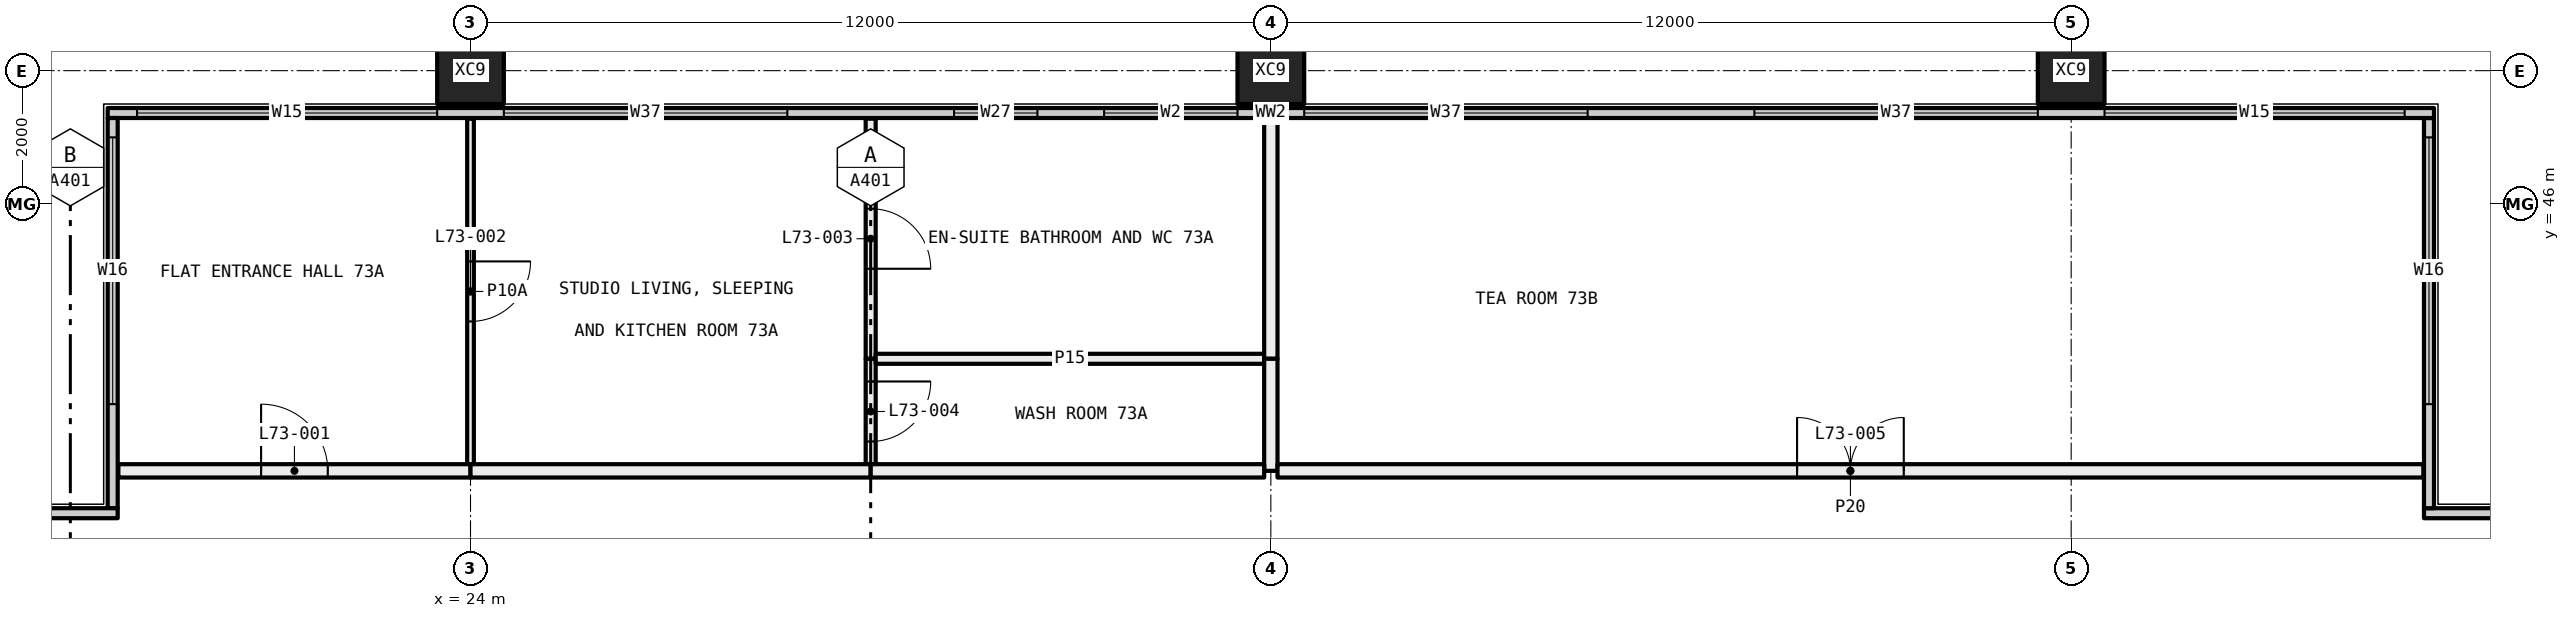
"""IFC4 building model, lengths in metres.
Left out: names, types, materials, properties, quantities, classifications, styles, units other than length and angle.
Written with IfcOpenShell. Run it as: python <this file> out.ifc"""

import sys

from ifc_helpers import new_model, si_unit, direction, frame, frame_2d, origin, origin_2d, place, context, subcontext, project, spatial, rectangle, hollow_rectangle, extrude, element, fill, save


model = new_model("IFC4")
c1 = context("Model", 3, precision=1e-05, world=origin(), true_north=direction((0.0, 1.0)))
c2 = subcontext(c1, "Body", "Model", "MODEL_VIEW")
j1 = project(units=[si_unit("LENGTHUNIT", "METRE"), si_unit("PLANEANGLEUNIT", "RADIAN")], contexts=[c1])
p1 = place(None, origin())
s1 = spatial("IfcSite", under=j1, at=p1, CompositionType="ELEMENT")
p2 = place(p1, origin())
s2 = spatial("IfcBuilding", under=s1, at=p2, CompositionType="ELEMENT")
p3 = place(p2, frame((0.0, 0.0, 269.7)))
s3 = spatial("IfcBuildingStorey", under=s2, at=p3, CompositionType="ELEMENT", Elevation=269.7)
for number, where, z_axis, x_axis in (
    (1, (24.0, 48.0, -0.4), (0.0, 0.0, 1.0), (1.0, 0.0, 0.0)),
    (2, (36.0, 48.0, -0.4), (0.0, 0.0, 1.0), (1.0, 0.0, 0.0)),
    (3, (48.0, 48.0, -0.4), (0.0, 0.0, 1.0), (1.0, 0.0, 0.0)),
):
    element("IfcColumn", number, at=place(p3, frame(where, z_axis=z_axis, x_axis=x_axis)), inside=s3, PredefinedType="COLUMN", context=c2, shape_type="SweptSolid", body=[
        extrude(hollow_rectangle(XDim=1.0, YDim=1.0, WallThickness=0.036, at=origin_2d()), origin(), (0.0, 0.0, 1.0), 3.45),
    ])
p4 = place(p3, frame((53.29, 41.365, 0.0), z_axis=(0.0, 0.0, 1.0), x_axis=(1.0, 0.0, 0.0)))
e4 = element("IfcWall", 4, at=p4, inside=s3, PredefinedType="ELEMENTEDWALL", context=c2, shape_type="SweptSolid", body=[
    extrude(rectangle(XDim=6.15, YDim=0.15, at=frame_2d((3.075, 0.0))), origin(), (0.0, 0.0, 1.0), 3.05),
])
p5 = place(p4, frame((1.71, 0.0, 0.45)))
e5 = element("IfcOpeningElement", 5, at=p5, cuts=e4, PredefinedType="OPENING", context=c2, shape_type="SweptSolid", body=[
    extrude(rectangle(XDim=4.0, YDim=2.55, at=frame_2d((2.0, 1.275))), frame((0.0, 0.085, 0.0), z_axis=(0.0, -1.0, 0.0), x_axis=(1.0, 0.0, 0.0)), (0.0, 0.0, 1.0), 0.17),
])
p6 = place(p3, frame((53.365, 41.44, 0.0), z_axis=(0.0, 0.0, 1.0), x_axis=(0.0, 1.0, 0.0)))
e6 = element("IfcWall", 6, at=p6, inside=s3, PredefinedType="ELEMENTEDWALL", context=c2, shape_type="SweptSolid", body=[
    extrude(rectangle(XDim=5.85, YDim=0.15, at=frame_2d((2.925, 0.0))), origin(), (0.0, 0.0, 1.0), 3.05),
])
p7 = place(p6, frame((1.56, 0.0, 0.45)))
e7 = element("IfcOpeningElement", 7, at=p7, cuts=e6, PredefinedType="OPENING", context=c2, shape_type="SweptSolid", body=[
    extrude(rectangle(XDim=4.0, YDim=2.55, at=frame_2d((2.0, 1.275))), frame((0.0, 0.085, 0.0), z_axis=(0.0, -1.0, 0.0), x_axis=(1.0, 0.0, 0.0)), (0.0, 0.0, 1.0), 0.17),
])
p8 = place(p3, frame((18.56, 47.365, 0.0), z_axis=(0.0, 0.0, 1.0), x_axis=(1.0, 0.0, 0.0)))
e8 = element("IfcWall", 8, at=p8, inside=s3, PredefinedType="ELEMENTEDWALL", context=c2, shape_type="SweptSolid", body=[
    extrude(rectangle(XDim=34.88, YDim=0.15, at=frame_2d((17.44, 0.0))), origin(), (0.0, 0.0, 1.0), 3.05),
])
p9 = place(p8, frame((0.44, 0.0, 0.45)))
e9 = element("IfcOpeningElement", 9, at=p9, cuts=e8, PredefinedType="OPENING", context=c2, shape_type="SweptSolid", body=[
    extrude(rectangle(XDim=4.5, YDim=2.55, at=frame_2d((2.25, 1.275))), frame((0.0, 0.085, 0.0), z_axis=(0.0, -1.0, 0.0), x_axis=(1.0, 0.0, 0.0)), (0.0, 0.0, 1.0), 0.17),
])
p10 = place(p8, frame((5.94, 0.0, 0.45)))
e10 = element("IfcOpeningElement", 10, at=p10, cuts=e8, PredefinedType="OPENING", context=c2, shape_type="SweptSolid", body=[
    extrude(rectangle(XDim=4.25, YDim=2.55, at=frame_2d((2.125, 1.275))), frame((0.0, 0.085, 0.0), z_axis=(0.0, -1.0, 0.0), x_axis=(1.0, 0.0, 0.0)), (0.0, 0.0, 1.0), 0.17),
])
p11 = place(p8, frame((12.69, 0.0, 0.45)))
e11 = element("IfcOpeningElement", 11, at=p11, cuts=e8, PredefinedType="OPENING", context=c2, shape_type="SweptSolid", body=[
    extrude(rectangle(XDim=1.25, YDim=2.55, at=frame_2d((0.625, 1.275))), frame((0.0, 0.085, 0.0), z_axis=(0.0, -1.0, 0.0), x_axis=(1.0, 0.0, 0.0)), (0.0, 0.0, 1.0), 0.17),
])
p12 = place(p8, frame((14.94, 0.0, 0.45)))
e12 = element("IfcOpeningElement", 12, at=p12, cuts=e8, PredefinedType="OPENING", context=c2, shape_type="SweptSolid", body=[
    extrude(rectangle(XDim=2.0, YDim=2.55, at=frame_2d((1.0, 1.275))), frame((0.0, 0.085, 0.0), z_axis=(0.0, -1.0, 0.0), x_axis=(1.0, 0.0, 0.0)), (0.0, 0.0, 1.0), 0.17),
])
p13 = place(p8, frame((17.94, 0.0, 0.45)))
e13 = element("IfcOpeningElement", 13, at=p13, cuts=e8, PredefinedType="OPENING", context=c2, shape_type="SweptSolid", body=[
    extrude(rectangle(XDim=4.25, YDim=2.55, at=frame_2d((2.125, 1.275))), frame((0.0, 0.085, 0.0), z_axis=(0.0, -1.0, 0.0), x_axis=(1.0, 0.0, 0.0)), (0.0, 0.0, 1.0), 0.17),
])
p14 = place(p8, frame((24.69, 0.0, 0.45)))
e14 = element("IfcOpeningElement", 14, at=p14, cuts=e8, PredefinedType="OPENING", context=c2, shape_type="SweptSolid", body=[
    extrude(rectangle(XDim=4.25, YDim=2.55, at=frame_2d((2.125, 1.275))), frame((0.0, 0.085, 0.0), z_axis=(0.0, -1.0, 0.0), x_axis=(1.0, 0.0, 0.0)), (0.0, 0.0, 1.0), 0.17),
])
p15 = place(p8, frame((29.94, 0.0, 0.45)))
e15 = element("IfcOpeningElement", 15, at=p15, cuts=e8, PredefinedType="OPENING", context=c2, shape_type="SweptSolid", body=[
    extrude(rectangle(XDim=4.5, YDim=2.55, at=frame_2d((2.25, 1.275))), frame((0.0, 0.085, 0.0), z_axis=(0.0, -1.0, 0.0), x_axis=(1.0, 0.0, 0.0)), (0.0, 0.0, 1.0), 0.17),
])
p16 = place(p3, frame((18.635, 41.44, 0.0), z_axis=(0.0, 0.0, 1.0), x_axis=(0.0, 1.0, 0.0)))
e16 = element("IfcWall", 16, at=p16, inside=s3, PredefinedType="ELEMENTEDWALL", context=c2, shape_type="SweptSolid", body=[
    extrude(rectangle(XDim=5.85, YDim=0.15, at=frame_2d((2.925, 0.0))), origin(), (0.0, 0.0, 1.0), 3.05),
])
p17 = place(p16, frame((1.56, 0.0, 0.45)))
e17 = element("IfcOpeningElement", 17, at=p17, cuts=e16, PredefinedType="OPENING", context=c2, shape_type="SweptSolid", body=[
    extrude(rectangle(XDim=4.0, YDim=2.55, at=frame_2d((2.0, 1.275))), frame((0.0, 0.085, 0.0), z_axis=(0.0, -1.0, 0.0), x_axis=(1.0, 0.0, 0.0)), (0.0, 0.0, 1.0), 0.17),
])
p18 = place(p3, frame((12.56, 41.365, 0.0), z_axis=(0.0, 0.0, 1.0), x_axis=(1.0, 0.0, 0.0)))
e18 = element("IfcWall", 18, at=p18, inside=s3, PredefinedType="ELEMENTEDWALL", context=c2, shape_type="SweptSolid", body=[
    extrude(rectangle(XDim=6.15, YDim=0.15, at=frame_2d((3.075, 0.0))), origin(), (0.0, 0.0, 1.0), 3.05),
])
p19 = place(p18, frame((0.44, 0.0, 0.45)))
e19 = element("IfcOpeningElement", 19, at=p19, cuts=e18, PredefinedType="OPENING", context=c2, shape_type="SweptSolid", body=[
    extrude(rectangle(XDim=4.0, YDim=2.55, at=frame_2d((2.0, 1.275))), frame((0.0, 0.085, 0.0), z_axis=(0.0, -1.0, 0.0), x_axis=(1.0, 0.0, 0.0)), (0.0, 0.0, 1.0), 0.17),
])
p20 = place(p3, frame((24.0, 42.1, 0.0), z_axis=(0.0, 0.0, 1.0), x_axis=(0.0, 1.0, 0.0)))
e20 = element("IfcWall", 20, at=p20, inside=s3, PredefinedType="PARTITIONING", context=c2, shape_type="SweptSolid", body=[
    extrude(rectangle(XDim=5.18, YDim=0.1, at=frame_2d((2.59, 0.0))), origin(), (0.0, 0.0, 1.0), 3.05),
])
p21 = place(p20, frame((2.14, 0.0, 0.0)))
e21 = element("IfcOpeningElement", 21, at=p21, cuts=e20, PredefinedType="OPENING", context=c2, shape_type="SweptSolid", body=[
    extrude(rectangle(XDim=0.9, YDim=2.1, at=frame_2d((0.45, 1.05))), frame((0.0, 0.06, 0.0), z_axis=(0.0, -1.0, 0.0), x_axis=(1.0, 0.0, 0.0)), (0.0, 0.0, 1.0), 0.12),
])
p22 = place(p3, frame((18.72, 42.0, 0.0), z_axis=(0.0, 0.0, 1.0), x_axis=(1.0, 0.0, 0.0)))
e22 = element("IfcWall", 22, at=p22, inside=s3, PredefinedType="PARTITIONING", context=c2, shape_type="SweptSolid", body=[
    extrude(rectangle(XDim=5.28, YDim=0.2, at=frame_2d((2.64, 0.0))), origin(), (0.0, 0.0, 1.0), 3.05),
])
p23 = place(p22, frame((2.14, 0.0, 0.0)))
e23 = element("IfcOpeningElement", 23, at=p23, cuts=e22, PredefinedType="OPENING", context=c2, shape_type="SweptSolid", body=[
    extrude(rectangle(XDim=1.0, YDim=2.1, at=frame_2d((0.5, 1.05))), frame((0.0, 0.11, 0.0), z_axis=(0.0, -1.0, 0.0), x_axis=(1.0, 0.0, 0.0)), (0.0, 0.0, 1.0), 0.22),
])
p24 = place(p3, frame((30.0, 43.68, 0.0), z_axis=(0.0, 0.0, 1.0), x_axis=(0.0, 1.0, 0.0)))
e24 = element("IfcWall", 24, at=p24, inside=s3, PredefinedType="PARTITIONING", context=c2, shape_type="SweptSolid", body=[
    extrude(rectangle(XDim=3.6, YDim=0.15, at=frame_2d((1.8, 0.0))), origin(), (0.0, 0.0, 1.0), 3.05),
])
p25 = place(p24, frame((1.35, 0.0, 0.0)))
e25 = element("IfcOpeningElement", 25, at=p25, cuts=e24, PredefinedType="OPENING", context=c2, shape_type="SweptSolid", body=[
    extrude(rectangle(XDim=0.9, YDim=2.1, at=frame_2d((0.45, 1.05))), frame((0.0, 0.085, 0.0), z_axis=(0.0, -1.0, 0.0), x_axis=(1.0, 0.0, 0.0)), (0.0, 0.0, 1.0), 0.17),
])
p26 = place(p3, frame((30.0, 42.1, 0.0), z_axis=(0.0, 0.0, 1.0), x_axis=(0.0, 1.0, 0.0)))
e26 = element("IfcWall", 26, at=p26, inside=s3, PredefinedType="PARTITIONING", context=c2, shape_type="SweptSolid", body=[
    extrude(rectangle(XDim=1.58, YDim=0.15, at=frame_2d((0.79, 0.0))), origin(), (0.0, 0.0, 1.0), 3.05),
])
p27 = place(p26, frame((0.34, 0.0, 0.0)))
e27 = element("IfcOpeningElement", 27, at=p27, cuts=e26, PredefinedType="OPENING", context=c2, shape_type="SweptSolid", body=[
    extrude(rectangle(XDim=0.9, YDim=2.1, at=frame_2d((0.45, 1.05))), frame((0.0, 0.085, 0.0), z_axis=(0.0, -1.0, 0.0), x_axis=(1.0, 0.0, 0.0)), (0.0, 0.0, 1.0), 0.17),
])
p28 = place(p3, frame((24.0, 42.0, 0.0), z_axis=(0.0, 0.0, 1.0), x_axis=(1.0, 0.0, 0.0)))
e28 = element("IfcWall", 28, at=p28, inside=s3, PredefinedType="PARTITIONING", context=c2, shape_type="SweptSolid", body=[
    extrude(rectangle(XDim=6.0, YDim=0.2, at=frame_2d((3.0, 0.0))), origin(), (0.0, 0.0, 1.0), 3.05),
])
p29 = place(p3, frame((30.075, 43.68, 0.0), z_axis=(0.0, 0.0, 1.0), x_axis=(1.0, 0.0, 0.0)))
e29 = element("IfcWall", 29, at=p29, inside=s3, PredefinedType="PARTITIONING", context=c2, shape_type="SweptSolid", body=[
    extrude(rectangle(XDim=5.825, YDim=0.15, at=frame_2d((2.913, 0.0))), origin(), (0.0, 0.0, 1.0), 3.05),
])
p30 = place(p3, frame((36.0, 43.68, 0.0), z_axis=(0.0, 0.0, 1.0), x_axis=(0.0, 1.0, 0.0)))
e30 = element("IfcWall", 30, at=p30, inside=s3, PredefinedType="PARTITIONING", context=c2, shape_type="SweptSolid", body=[
    extrude(rectangle(XDim=3.6, YDim=0.2, at=frame_2d((1.8, 0.0))), origin(), (0.0, 0.0, 1.0), 2.45),
])
p31 = place(p3, frame((36.0, 42.0, 0.0), z_axis=(0.0, 0.0, 1.0), x_axis=(0.0, 1.0, 0.0)))
e31 = element("IfcWall", 31, at=p31, inside=s3, PredefinedType="PARTITIONING", context=c2, shape_type="SweptSolid", body=[
    extrude(rectangle(XDim=1.68, YDim=0.2, at=frame_2d((0.84, 0.0))), origin(), (0.0, 0.0, 1.0), 2.45),
])
p32 = place(p3, frame((30.0, 42.0, 0.0), z_axis=(0.0, 0.0, 1.0), x_axis=(1.0, 0.0, 0.0)))
e32 = element("IfcWall", 32, at=p32, inside=s3, PredefinedType="PARTITIONING", context=c2, shape_type="SweptSolid", body=[
    extrude(rectangle(XDim=5.9, YDim=0.2, at=frame_2d((2.95, 0.0))), origin(), (0.0, 0.0, 1.0), 3.05),
])
p33 = place(p3, frame((36.1, 42.0, 0.0), z_axis=(0.0, 0.0, 1.0), x_axis=(1.0, 0.0, 0.0)))
e33 = element("IfcWall", 33, at=p33, inside=s3, PredefinedType="PARTITIONING", context=c2, shape_type="SweptSolid", body=[
    extrude(rectangle(XDim=17.18, YDim=0.2, at=frame_2d((8.59, 0.0))), origin(), (0.0, 0.0, 1.0), 3.05),
])
p34 = place(p33, frame((7.79, 0.0, 0.0)))
e34 = element("IfcOpeningElement", 34, at=p34, cuts=e33, PredefinedType="OPENING", context=c2, shape_type="SweptSolid", body=[
    extrude(rectangle(XDim=1.6, YDim=2.1, at=frame_2d((0.8, 1.05))), frame((0.0, 0.11, 0.0), z_axis=(0.0, -1.0, 0.0), x_axis=(1.0, 0.0, 0.0)), (0.0, 0.0, 1.0), 0.22),
])
p35 = place(p7, origin())
e35 = element("IfcWindow", 35, at=p35, inside=s3, PartitioningType="SINGLE_PANEL", PredefinedType="WINDOW", context=c2, shape_type="SweptSolid", body=[
    extrude(rectangle(XDim=4.0, YDim=2.55, at=frame_2d((2.0, 1.275))), frame((0.0, 0.03, 0.0), z_axis=(0.0, -1.0, 0.0), x_axis=(1.0, 0.0, 0.0)), (0.0, 0.0, 1.0), 0.06),
])
fill(e7, e35)
p36 = place(p9, origin())
e36 = element("IfcWindow", 36, at=p36, inside=s3, PartitioningType="SINGLE_PANEL", PredefinedType="WINDOW", context=c2, shape_type="SweptSolid", body=[
    extrude(rectangle(XDim=4.5, YDim=2.55, at=frame_2d((2.25, 1.275))), frame((0.0, 0.03, 0.0), z_axis=(0.0, -1.0, 0.0), x_axis=(1.0, 0.0, 0.0)), (0.0, 0.0, 1.0), 0.06),
])
fill(e9, e36)
p37 = place(p10, origin())
e37 = element("IfcWindow", 37, at=p37, inside=s3, PartitioningType="SINGLE_PANEL", PredefinedType="WINDOW", context=c2, shape_type="SweptSolid", body=[
    extrude(rectangle(XDim=4.25, YDim=2.55, at=frame_2d((2.125, 1.275))), frame((0.0, 0.03, 0.0), z_axis=(0.0, -1.0, 0.0), x_axis=(1.0, 0.0, 0.0)), (0.0, 0.0, 1.0), 0.06),
])
fill(e10, e37)
p38 = place(p11, origin())
e38 = element("IfcWindow", 38, at=p38, inside=s3, PartitioningType="SINGLE_PANEL", PredefinedType="WINDOW", context=c2, shape_type="SweptSolid", body=[
    extrude(rectangle(XDim=1.25, YDim=2.55, at=frame_2d((0.625, 1.275))), frame((0.0, 0.03, 0.0), z_axis=(0.0, -1.0, 0.0), x_axis=(1.0, 0.0, 0.0)), (0.0, 0.0, 1.0), 0.06),
])
fill(e11, e38)
p39 = place(p12, origin())
e39 = element("IfcWindow", 39, at=p39, inside=s3, PartitioningType="SINGLE_PANEL", PredefinedType="WINDOW", context=c2, shape_type="SweptSolid", body=[
    extrude(rectangle(XDim=2.0, YDim=2.55, at=frame_2d((1.0, 1.275))), frame((0.0, 0.03, 0.0), z_axis=(0.0, -1.0, 0.0), x_axis=(1.0, 0.0, 0.0)), (0.0, 0.0, 1.0), 0.06),
])
fill(e12, e39)
p40 = place(p13, origin())
e40 = element("IfcWindow", 40, at=p40, inside=s3, PartitioningType="SINGLE_PANEL", PredefinedType="WINDOW", context=c2, shape_type="SweptSolid", body=[
    extrude(rectangle(XDim=4.25, YDim=2.55, at=frame_2d((2.125, 1.275))), frame((0.0, 0.03, 0.0), z_axis=(0.0, -1.0, 0.0), x_axis=(1.0, 0.0, 0.0)), (0.0, 0.0, 1.0), 0.06),
])
fill(e13, e40)
p41 = place(p14, origin())
e41 = element("IfcWindow", 41, at=p41, inside=s3, PartitioningType="SINGLE_PANEL", PredefinedType="WINDOW", context=c2, shape_type="SweptSolid", body=[
    extrude(rectangle(XDim=4.25, YDim=2.55, at=frame_2d((2.125, 1.275))), frame((0.0, 0.03, 0.0), z_axis=(0.0, -1.0, 0.0), x_axis=(1.0, 0.0, 0.0)), (0.0, 0.0, 1.0), 0.06),
])
fill(e14, e41)
p42 = place(p15, origin())
e42 = element("IfcWindow", 42, at=p42, inside=s3, PartitioningType="SINGLE_PANEL", PredefinedType="WINDOW", context=c2, shape_type="SweptSolid", body=[
    extrude(rectangle(XDim=4.5, YDim=2.55, at=frame_2d((2.25, 1.275))), frame((0.0, 0.03, 0.0), z_axis=(0.0, -1.0, 0.0), x_axis=(1.0, 0.0, 0.0)), (0.0, 0.0, 1.0), 0.06),
])
fill(e15, e42)
p43 = place(p17, origin())
e43 = element("IfcWindow", 43, at=p43, inside=s3, PartitioningType="SINGLE_PANEL", PredefinedType="WINDOW", context=c2, shape_type="SweptSolid", body=[
    extrude(rectangle(XDim=4.0, YDim=2.55, at=frame_2d((2.0, 1.275))), frame((0.0, 0.03, 0.0), z_axis=(0.0, -1.0, 0.0), x_axis=(1.0, 0.0, 0.0)), (0.0, 0.0, 1.0), 0.06),
])
fill(e17, e43)
p44 = place(p23, origin())
e44 = element("IfcDoor", 44, at=p44, inside=s3, OperationType="SINGLE_SWING_RIGHT", PredefinedType="DOOR", context=c2, shape_type="SweptSolid", body=[
    extrude(rectangle(XDim=1.0, YDim=2.1, at=frame_2d((0.5, 1.05))), frame((0.0, 0.025, 0.0), z_axis=(0.0, -1.0, 0.0), x_axis=(1.0, 0.0, 0.0)), (0.0, 0.0, 1.0), 0.05),
])
fill(e23, e44)
p45 = place(p21, frame((0.9, 0.0, 0.0), x_axis=(-1.0, 0.0, 0.0)))
e45 = element("IfcDoor", 45, at=p45, inside=s3, OperationType="SINGLE_SWING_RIGHT", PredefinedType="DOOR", context=c2, shape_type="SweptSolid", body=[
    extrude(rectangle(XDim=0.9, YDim=2.1, at=frame_2d((0.45, 1.05))), frame((0.0, 0.025, 0.0), z_axis=(0.0, -1.0, 0.0), x_axis=(1.0, 0.0, 0.0)), (0.0, 0.0, 1.0), 0.05),
])
fill(e21, e45)
p46 = place(p25, frame((0.9, 0.0, 0.0), x_axis=(-1.0, 0.0, 0.0)))
e46 = element("IfcDoor", 46, at=p46, inside=s3, OperationType="SINGLE_SWING_LEFT", PredefinedType="DOOR", context=c2, shape_type="SweptSolid", body=[
    extrude(rectangle(XDim=0.9, YDim=2.1, at=frame_2d((0.45, 1.05))), frame((0.0, 0.025, 0.0), z_axis=(0.0, -1.0, 0.0), x_axis=(1.0, 0.0, 0.0)), (0.0, 0.0, 1.0), 0.05),
])
fill(e25, e46)
p47 = place(p27, frame((0.9, 0.0, 0.0), x_axis=(-1.0, 0.0, 0.0)))
e47 = element("IfcDoor", 47, at=p47, inside=s3, OperationType="SINGLE_SWING_RIGHT", PredefinedType="DOOR", context=c2, shape_type="SweptSolid", body=[
    extrude(rectangle(XDim=0.9, YDim=2.1, at=frame_2d((0.45, 1.05))), frame((0.0, 0.025, 0.0), z_axis=(0.0, -1.0, 0.0), x_axis=(1.0, 0.0, 0.0)), (0.0, 0.0, 1.0), 0.05),
])
fill(e27, e47)
p48 = place(p34, origin())
e48 = element("IfcDoor", 48, at=p48, inside=s3, OperationType="DOUBLE_DOOR_SINGLE_SWING", PredefinedType="DOOR", context=c2, shape_type="SweptSolid", body=[
    extrude(rectangle(XDim=1.6, YDim=2.1, at=frame_2d((0.8, 1.05))), frame((0.0, 0.025, 0.0), z_axis=(0.0, -1.0, 0.0), x_axis=(1.0, 0.0, 0.0)), (0.0, 0.0, 1.0), 0.05),
])
fill(e34, e48)
save(model, sys.argv[1])
